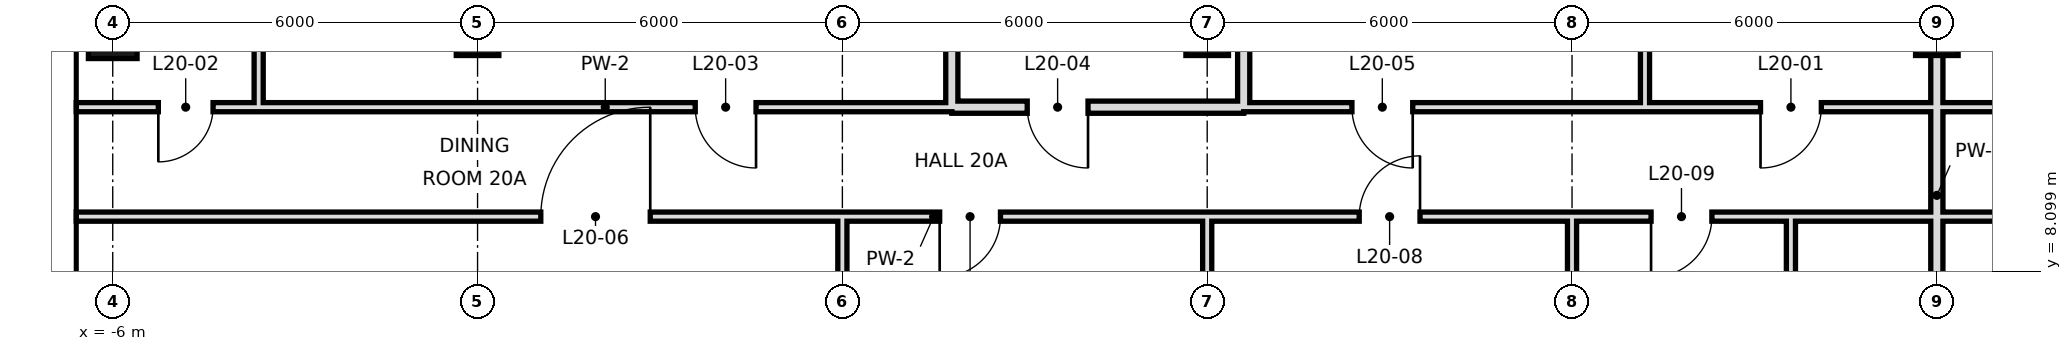
"""IFC4 building model, lengths in metres.
Left out: names, types, materials, properties, quantities, classifications, styles, units other than length and angle.
Written with IfcOpenShell. Run it as: python <this file> out.ifc"""

import sys

from ifc_helpers import new_model, si_unit, direction, frame, frame_2d, origin, origin_2d, place, context, subcontext, project, spatial, rectangle, hollow_rectangle, extrude, element, fill, save


model = new_model("IFC4")
c1 = context("Model", 3, precision=1e-05, world=origin(), true_north=direction((0.0, 1.0)))
c2 = subcontext(c1, "Body", "Model", "MODEL_VIEW")
j1 = project(units=[si_unit("LENGTHUNIT", "METRE"), si_unit("PLANEANGLEUNIT", "RADIAN")], contexts=[c1])
p1 = place(None, origin())
s1 = spatial("IfcSite", under=j1, at=p1, CompositionType="ELEMENT")
p2 = place(p1, origin())
s2 = spatial("IfcBuilding", under=s1, at=p2, CompositionType="ELEMENT")
p3 = place(p2, frame((0.0, 0.0, 96.2)))
s3 = spatial("IfcBuildingStorey", under=s2, at=p3, CompositionType="ELEMENT", Elevation=96.2)
p4 = place(p3, frame((-6.0, 12.0, -0.3), z_axis=(0.0, 0.0, 1.0), x_axis=(1.0, 0.0, 0.0)))
e1 = element("IfcColumn", 1, at=p4, inside=s3, PredefinedType="COLUMN", context=c2, shape_type="SweptSolid", body=[
    extrude(hollow_rectangle(XDim=0.8, YDim=0.8, WallThickness=0.04, at=origin_2d()), origin(), (0.0, 0.0, 1.0), 3.9),
])
for number, where, z_axis, x_axis in (
    (2, (0.0, 12.0, 0.0), (0.0, 0.0, 1.0), (1.0, 0.0, 0.0)),
    (3, (12.0, 12.0, 0.0), (0.0, 0.0, 1.0), (1.0, 0.0, 0.0)),
    (4, (24.0, 12.0, 0.0), (0.0, 0.0, 1.0), (1.0, 0.0, 0.0)),
):
    element("IfcColumn", number, at=place(p3, frame(where, z_axis=z_axis, x_axis=x_axis)), inside=s3, PredefinedType="COLUMN", context=c2, shape_type="SweptSolid", body=[
        extrude(hollow_rectangle(XDim=0.7, YDim=0.7, WallThickness=0.036, at=origin_2d()), origin(), (0.0, 0.0, 1.0), 3.6),
    ])
p5 = place(p3, frame((-3.6, 10.8, 0.0), z_axis=(0.0, 0.0, 1.0), x_axis=(0.0, 1.0, 0.0)))
e5 = element("IfcWall", 5, at=p5, inside=s3, PredefinedType="PARTITIONING", context=c2, shape_type="SweptSolid", body=[
    extrude(rectangle(XDim=7.2, YDim=0.15, at=frame_2d((3.6, 0.0))), origin(), (0.0, 0.0, 1.0), 3.42),
])
p6 = place(p3, frame((12.0, 0.0, 0.0), z_axis=(0.0, 0.0, 1.0), x_axis=(0.0, 1.0, 0.0)))
e6 = element("IfcWall", 6, at=p6, inside=s3, PredefinedType="PARTITIONING", context=c2, shape_type="SweptSolid", body=[
    extrude(rectangle(XDim=9.0, YDim=0.15, at=frame_2d((4.5, 0.0))), origin(), (0.0, 0.0, 1.0), 2.72),
])
p7 = place(p3, frame((12.6, 10.8, 0.0), z_axis=(0.0, 0.0, 1.0), x_axis=(0.0, 1.0, 0.0)))
e7 = element("IfcWall", 7, at=p7, inside=s3, PredefinedType="SOLIDWALL", context=c2, shape_type="SweptSolid", body=[
    extrude(rectangle(XDim=7.9, YDim=0.2, at=frame_2d((3.95, 0.0))), origin(), (0.0, 0.0, 1.0), 2.72),
])
p8 = place(p3, frame((18.0, -0.6, 0.0), z_axis=(0.0, 0.0, 1.0), x_axis=(0.0, 1.0, 0.0)))
e8 = element("IfcWall", 8, at=p8, inside=s3, PredefinedType="PARTITIONING", context=c2, shape_type="SweptSolid", body=[
    extrude(rectangle(XDim=9.6, YDim=0.15, at=frame_2d((4.8, 0.0))), origin(), (0.0, 0.0, 1.0), 2.72),
])
p9 = place(p3, frame((19.2, 10.8, 0.0), z_axis=(0.0, 0.0, 1.0), x_axis=(0.0, 1.0, 0.0)))
e9 = element("IfcWall", 9, at=p9, inside=s3, PredefinedType="PARTITIONING", context=c2, shape_type="SweptSolid", body=[
    extrude(rectangle(XDim=7.9, YDim=0.15, at=frame_2d((3.95, 0.0))), origin(), (0.0, 0.0, 1.0), 3.42),
])
p10 = place(p3, frame((21.6, 6.0, 0.0), z_axis=(0.0, 0.0, 1.0), x_axis=(0.0, 1.0, 0.0)))
e10 = element("IfcWall", 10, at=p10, inside=s3, PredefinedType="PARTITIONING", context=c2, shape_type="SweptSolid", body=[
    extrude(rectangle(XDim=3.0, YDim=0.15, at=frame_2d((1.5, 0.0))), origin(), (0.0, 0.0, 1.0), 3.42),
])
p11 = place(p3, frame((24.0, 0.0, 0.0), z_axis=(0.0, 0.0, 1.0), x_axis=(0.0, 1.0, 0.0)))
e11 = element("IfcWall", 11, at=p11, inside=s3, PredefinedType="SOLIDWALL", context=c2, shape_type="SweptSolid", body=[
    extrude(rectangle(XDim=18.7, YDim=0.2, at=frame_2d((9.35, 0.0))), origin(), (0.0, 0.0, 1.0), 2.72),
])
p12 = place(p3, frame((6.0, -0.6, 0.0), z_axis=(0.0, 0.0, 1.0), x_axis=(0.0, 1.0, 0.0)))
e12 = element("IfcWall", 12, at=p12, inside=s3, PredefinedType="PARTITIONING", context=c2, shape_type="SweptSolid", body=[
    extrude(rectangle(XDim=9.6, YDim=0.15, at=frame_2d((4.8, 0.0))), origin(), (0.0, 0.0, 1.0), 2.72),
])
p13 = place(p3, frame((7.8, 10.8, 0.0), z_axis=(0.0, 0.0, 1.0), x_axis=(0.0, 1.0, 0.0)))
e13 = element("IfcWall", 13, at=p13, inside=s3, PredefinedType="SOLIDWALL", context=c2, shape_type="SweptSolid", body=[
    extrude(rectangle(XDim=7.9, YDim=0.2, at=frame_2d((3.95, 0.0))), origin(), (0.0, 0.0, 1.0), 2.72),
])
p14 = place(p3, frame((7.8, 10.8, 0.0), z_axis=(0.0, 0.0, 1.0), x_axis=(1.0, 0.0, 0.0)))
e14 = element("IfcWall", 14, at=p14, inside=s3, PredefinedType="SOLIDWALL", context=c2, shape_type="SweptSolid", body=[
    extrude(rectangle(XDim=4.8, YDim=0.2, at=frame_2d((2.4, 0.0))), origin(), (0.0, 0.0, 1.0), 2.72),
])
p15 = place(p14, frame((1.24, 0.0, 0.0)))
e15 = element("IfcOpeningElement", 15, at=p15, cuts=e14, PredefinedType="OPENING", context=c2, shape_type="SweptSolid", body=[
    extrude(rectangle(XDim=1.0, YDim=2.4, at=frame_2d((0.5, 1.2))), frame((0.0, 0.11, 0.0), z_axis=(0.0, -1.0, 0.0), x_axis=(1.0, 0.0, 0.0)), (0.0, 0.0, 1.0), 0.22),
])
p16 = place(p3, frame((-3.6, 10.8, 0.0), z_axis=(0.0, 0.0, 1.0), x_axis=(1.0, 0.0, 0.0)))
e16 = element("IfcWall", 16, at=p16, inside=s3, PredefinedType="PARTITIONING", context=c2, shape_type="SweptSolid", body=[
    extrude(rectangle(XDim=11.4, YDim=0.15, at=frame_2d((5.7, 0.0))), origin(), (0.0, 0.0, 1.0), 3.42),
])
p17 = place(p16, frame((7.18, 0.0, 0.0)))
e17 = element("IfcOpeningElement", 17, at=p17, cuts=e16, PredefinedType="OPENING", context=c2, shape_type="SweptSolid", body=[
    extrude(rectangle(XDim=1.0, YDim=2.4, at=frame_2d((0.5, 1.2))), frame((0.0, 0.085, 0.0), z_axis=(0.0, -1.0, 0.0), x_axis=(1.0, 0.0, 0.0)), (0.0, 0.0, 1.0), 0.17),
])
p18 = place(p3, frame((12.6, 10.8, 0.0), z_axis=(0.0, 0.0, 1.0), x_axis=(1.0, 0.0, 0.0)))
e18 = element("IfcWall", 18, at=p18, inside=s3, PredefinedType="PARTITIONING", context=c2, shape_type="SweptSolid", body=[
    extrude(rectangle(XDim=40.2, YDim=0.15, at=frame_2d((20.1, 0.0))), origin(), (0.0, 0.0, 1.0), 3.42),
])
p19 = place(p18, frame((8.5, 0.0, 0.0)))
e19 = element("IfcOpeningElement", 19, at=p19, cuts=e18, PredefinedType="OPENING", context=c2, shape_type="SweptSolid", body=[
    extrude(rectangle(XDim=1.0, YDim=2.4, at=frame_2d((0.5, 1.2))), frame((0.0, 0.085, 0.0), z_axis=(0.0, -1.0, 0.0), x_axis=(1.0, 0.0, 0.0)), (0.0, 0.0, 1.0), 0.17),
])
p20 = place(p18, frame((1.78, 0.0, 0.0)))
e20 = element("IfcOpeningElement", 20, at=p20, cuts=e18, PredefinedType="OPENING", context=c2, shape_type="SweptSolid", body=[
    extrude(rectangle(XDim=1.0, YDim=2.4, at=frame_2d((0.5, 1.2))), frame((0.0, 0.085, 0.0), z_axis=(0.0, -1.0, 0.0), x_axis=(1.0, 0.0, 0.0)), (0.0, 0.0, 1.0), 0.17),
])
p21 = place(p18, frame((23.8, 0.0, 0.0)))
e21 = element("IfcOpeningElement", 21, at=p21, cuts=e18, PredefinedType="OPENING", context=c2, shape_type="SweptSolid", body=[
    extrude(rectangle(XDim=1.0, YDim=2.4, at=frame_2d((0.5, 1.2))), frame((0.0, 0.085, 0.0), z_axis=(0.0, -1.0, 0.0), x_axis=(1.0, 0.0, 0.0)), (0.0, 0.0, 1.0), 0.17),
])
p22 = place(p18, frame((16.3, 0.0, 0.0)))
e22 = element("IfcOpeningElement", 22, at=p22, cuts=e18, PredefinedType="OPENING", context=c2, shape_type="SweptSolid", body=[
    extrude(rectangle(XDim=1.0, YDim=2.4, at=frame_2d((0.5, 1.2))), frame((0.0, 0.085, 0.0), z_axis=(0.0, -1.0, 0.0), x_axis=(1.0, 0.0, 0.0)), (0.0, 0.0, 1.0), 0.17),
])
p23 = place(p18, frame((33.7, 0.0, 0.0)))
e23 = element("IfcOpeningElement", 23, at=p23, cuts=e18, PredefinedType="OPENING", context=c2, shape_type="SweptSolid", body=[
    extrude(rectangle(XDim=1.0, YDim=2.4, at=frame_2d((0.5, 1.2))), frame((0.0, 0.085, 0.0), z_axis=(0.0, -1.0, 0.0), x_axis=(1.0, 0.0, 0.0)), (0.0, 0.0, 1.0), 0.17),
])
p24 = place(p3, frame((-6.6, 10.8, 0.0), z_axis=(0.0, 0.0, 1.0), x_axis=(1.0, 0.0, 0.0)))
e24 = element("IfcWall", 24, at=p24, inside=s3, PredefinedType="PARTITIONING", context=c2, shape_type="SweptSolid", body=[
    extrude(rectangle(XDim=3.0, YDim=0.15, at=frame_2d((1.5, 0.0))), origin(), (0.0, 0.0, 1.0), 3.42),
])
p25 = place(p24, frame((1.35, 0.0, 0.0)))
e25 = element("IfcOpeningElement", 25, at=p25, cuts=e24, PredefinedType="OPENING", context=c2, shape_type="SweptSolid", body=[
    extrude(rectangle(XDim=0.9, YDim=2.4, at=frame_2d((0.45, 1.2))), frame((0.0, 0.085, 0.0), z_axis=(0.0, -1.0, 0.0), x_axis=(1.0, 0.0, 0.0)), (0.0, 0.0, 1.0), 0.17),
])
p26 = place(p3, frame((-6.6, 9.0, 0.0), z_axis=(0.0, 0.0, 1.0), x_axis=(1.0, 0.0, 0.0)))
e26 = element("IfcWall", 26, at=p26, inside=s3, PredefinedType="PARTITIONING", context=c2, shape_type="SweptSolid", body=[
    extrude(rectangle(XDim=28.2, YDim=0.15, at=frame_2d((14.1, 0.0))), origin(), (0.0, 0.0, 1.0), 3.42),
])
p27 = place(p26, frame((7.64, 0.0, 0.0)))
e27 = element("IfcOpeningElement", 27, at=p27, cuts=e26, PredefinedType="OPENING", context=c2, shape_type="SweptSolid", body=[
    extrude(rectangle(XDim=1.8, YDim=2.4, at=frame_2d((0.9, 1.2))), frame((0.0, 0.085, 0.0), z_axis=(0.0, -1.0, 0.0), x_axis=(1.0, 0.0, 0.0)), (0.0, 0.0, 1.0), 0.17),
])
p28 = place(p26, frame((14.2, 0.0, 0.0)))
e28 = element("IfcOpeningElement", 28, at=p28, cuts=e26, PredefinedType="OPENING", context=c2, shape_type="SweptSolid", body=[
    extrude(rectangle(XDim=1.0, YDim=2.4, at=frame_2d((0.5, 1.2))), frame((0.0, 0.085, 0.0), z_axis=(0.0, -1.0, 0.0), x_axis=(1.0, 0.0, 0.0)), (0.0, 0.0, 1.0), 0.17),
])
p29 = place(p26, frame((21.1, 0.0, 0.0)))
e29 = element("IfcOpeningElement", 29, at=p29, cuts=e26, PredefinedType="OPENING", context=c2, shape_type="SweptSolid", body=[
    extrude(rectangle(XDim=1.0, YDim=2.4, at=frame_2d((0.5, 1.2))), frame((0.0, 0.085, 0.0), z_axis=(0.0, -1.0, 0.0), x_axis=(1.0, 0.0, 0.0)), (0.0, 0.0, 1.0), 0.17),
])
p30 = place(p26, frame((25.9, 0.0, 0.0)))
e30 = element("IfcOpeningElement", 30, at=p30, cuts=e26, PredefinedType="OPENING", context=c2, shape_type="SweptSolid", body=[
    extrude(rectangle(XDim=1.0, YDim=2.4, at=frame_2d((0.5, 1.2))), frame((0.0, 0.085, 0.0), z_axis=(0.0, -1.0, 0.0), x_axis=(1.0, 0.0, 0.0)), (0.0, 0.0, 1.0), 0.17),
])
p31 = place(p3, frame((24.0, 9.0, 0.0), z_axis=(0.0, 0.0, 1.0), x_axis=(1.0, 0.0, 0.0)))
e31 = element("IfcWall", 31, at=p31, inside=s3, PredefinedType="PARTITIONING", context=c2, shape_type="SweptSolid", body=[
    extrude(rectangle(XDim=18.0, YDim=0.15, at=frame_2d((9.0, 0.0))), origin(), (0.0, 0.0, 1.0), 3.42),
])
p32 = place(p31, frame((2.1, 0.0, 0.0)))
e32 = element("IfcOpeningElement", 32, at=p32, cuts=e31, PredefinedType="OPENING", context=c2, shape_type="SweptSolid", body=[
    extrude(rectangle(XDim=1.8, YDim=2.4, at=frame_2d((0.9, 1.2))), frame((0.0, 0.085, 0.0), z_axis=(0.0, -1.0, 0.0), x_axis=(1.0, 0.0, 0.0)), (0.0, 0.0, 1.0), 0.17),
])
p33 = place(p31, frame((9.16, 0.0, 0.0)))
e33 = element("IfcOpeningElement", 33, at=p33, cuts=e31, PredefinedType="OPENING", context=c2, shape_type="SweptSolid", body=[
    extrude(rectangle(XDim=1.8, YDim=2.4, at=frame_2d((0.9, 1.2))), frame((0.0, 0.085, 0.0), z_axis=(0.0, -1.0, 0.0), x_axis=(1.0, 0.0, 0.0)), (0.0, 0.0, 1.0), 0.17),
])
p34 = place(p3, frame((21.6, 9.0, 0.0), z_axis=(0.0, 0.0, 1.0), x_axis=(1.0, 0.0, 0.0)))
e34 = element("IfcWall", 34, at=p34, inside=s3, PredefinedType="PARTITIONING", context=c2, shape_type="SweptSolid", body=[
    extrude(rectangle(XDim=2.4, YDim=0.15, at=frame_2d((1.2, 0.0))), origin(), (0.0, 0.0, 1.0), 3.42),
])
p35 = place(p19, frame((1.0, 0.0, 0.0), z_axis=(0.0, 0.0, 1.0), x_axis=(-1.0, 0.0, 0.0)))
e35 = element("IfcDoor", 35, at=p35, inside=s3, OperationType="SINGLE_SWING_RIGHT", PredefinedType="DOOR", context=c2, shape_type="SweptSolid", body=[
    extrude(rectangle(XDim=1.0, YDim=2.4, at=frame_2d((0.5, 1.2))), frame((0.0, 0.025, 0.0), z_axis=(0.0, -1.0, 0.0), x_axis=(1.0, 0.0, 0.0)), (0.0, 0.0, 1.0), 0.05),
])
fill(e19, e35)
p36 = place(p25, frame((0.9, 0.0, 0.0), z_axis=(0.0, 0.0, 1.0), x_axis=(-1.0, 0.0, 0.0)))
e36 = element("IfcDoor", 36, at=p36, inside=s3, OperationType="SINGLE_SWING_RIGHT", PredefinedType="DOOR", context=c2, shape_type="SweptSolid", body=[
    extrude(rectangle(XDim=0.9, YDim=2.4, at=frame_2d((0.45, 1.2))), frame((0.0, 0.025, 0.0), z_axis=(0.0, -1.0, 0.0), x_axis=(1.0, 0.0, 0.0)), (0.0, 0.0, 1.0), 0.05),
])
fill(e25, e36)
p37 = place(p17, origin())
e37 = element("IfcDoor", 37, at=p37, inside=s3, OperationType="SINGLE_SWING_RIGHT", PredefinedType="DOOR", context=c2, shape_type="SweptSolid", body=[
    extrude(rectangle(XDim=1.0, YDim=2.4, at=frame_2d((0.5, 1.2))), frame((0.0, 0.025, 0.0), z_axis=(0.0, -1.0, 0.0), x_axis=(1.0, 0.0, 0.0)), (0.0, 0.0, 1.0), 0.05),
])
fill(e17, e37)
p38 = place(p15, origin())
e38 = element("IfcDoor", 38, at=p38, inside=s3, OperationType="SINGLE_SWING_RIGHT", PredefinedType="DOOR", context=c2, shape_type="SweptSolid", body=[
    extrude(rectangle(XDim=1.0, YDim=2.4, at=frame_2d((0.5, 1.2))), frame((0.0, 0.025, 0.0), z_axis=(0.0, -1.0, 0.0), x_axis=(1.0, 0.0, 0.0)), (0.0, 0.0, 1.0), 0.05),
])
fill(e15, e38)
p39 = place(p20, origin())
e39 = element("IfcDoor", 39, at=p39, inside=s3, OperationType="SINGLE_SWING_RIGHT", PredefinedType="DOOR", context=c2, shape_type="SweptSolid", body=[
    extrude(rectangle(XDim=1.0, YDim=2.4, at=frame_2d((0.5, 1.2))), frame((0.0, 0.025, 0.0), z_axis=(0.0, -1.0, 0.0), x_axis=(1.0, 0.0, 0.0)), (0.0, 0.0, 1.0), 0.05),
])
fill(e20, e39)
p40 = place(p27, frame((1.8, 0.0, 0.0), z_axis=(0.0, 0.0, 1.0), x_axis=(-1.0, 0.0, 0.0)))
e40 = element("IfcDoor", 40, at=p40, inside=s3, OperationType="SINGLE_SWING_LEFT", PredefinedType="DOOR", context=c2, shape_type="SweptSolid", body=[
    extrude(rectangle(XDim=1.8, YDim=2.4, at=frame_2d((0.9, 1.2))), frame((0.0, 0.025, 0.0), z_axis=(0.0, -1.0, 0.0), x_axis=(1.0, 0.0, 0.0)), (0.0, 0.0, 1.0), 0.05),
])
fill(e27, e40)
p41 = place(p28, frame((1.0, 0.0, 0.0), z_axis=(0.0, 0.0, 1.0), x_axis=(-1.0, 0.0, 0.0)))
e41 = element("IfcDoor", 41, at=p41, inside=s3, OperationType="SINGLE_SWING_RIGHT", PredefinedType="DOOR", context=c2, shape_type="SweptSolid", body=[
    extrude(rectangle(XDim=1.0, YDim=2.4, at=frame_2d((0.5, 1.2))), frame((0.0, 0.025, 0.0), z_axis=(0.0, -1.0, 0.0), x_axis=(1.0, 0.0, 0.0)), (0.0, 0.0, 1.0), 0.05),
])
fill(e28, e41)
p42 = place(p29, frame((1.0, 0.0, 0.0), z_axis=(0.0, 0.0, 1.0), x_axis=(-1.0, 0.0, 0.0)))
e42 = element("IfcDoor", 42, at=p42, inside=s3, OperationType="SINGLE_SWING_LEFT", PredefinedType="DOOR", context=c2, shape_type="SweptSolid", body=[
    extrude(rectangle(XDim=1.0, YDim=2.4, at=frame_2d((0.5, 1.2))), frame((0.0, 0.025, 0.0), z_axis=(0.0, -1.0, 0.0), x_axis=(1.0, 0.0, 0.0)), (0.0, 0.0, 1.0), 0.05),
])
fill(e29, e42)
p43 = place(p30, frame((1.0, 0.0, 0.0), z_axis=(0.0, 0.0, 1.0), x_axis=(-1.0, 0.0, 0.0)))
e43 = element("IfcDoor", 43, at=p43, inside=s3, OperationType="SINGLE_SWING_RIGHT", PredefinedType="DOOR", context=c2, shape_type="SweptSolid", body=[
    extrude(rectangle(XDim=1.0, YDim=2.4, at=frame_2d((0.5, 1.2))), frame((0.0, 0.025, 0.0), z_axis=(0.0, -1.0, 0.0), x_axis=(1.0, 0.0, 0.0)), (0.0, 0.0, 1.0), 0.05),
])
fill(e30, e43)
save(model, sys.argv[1])
